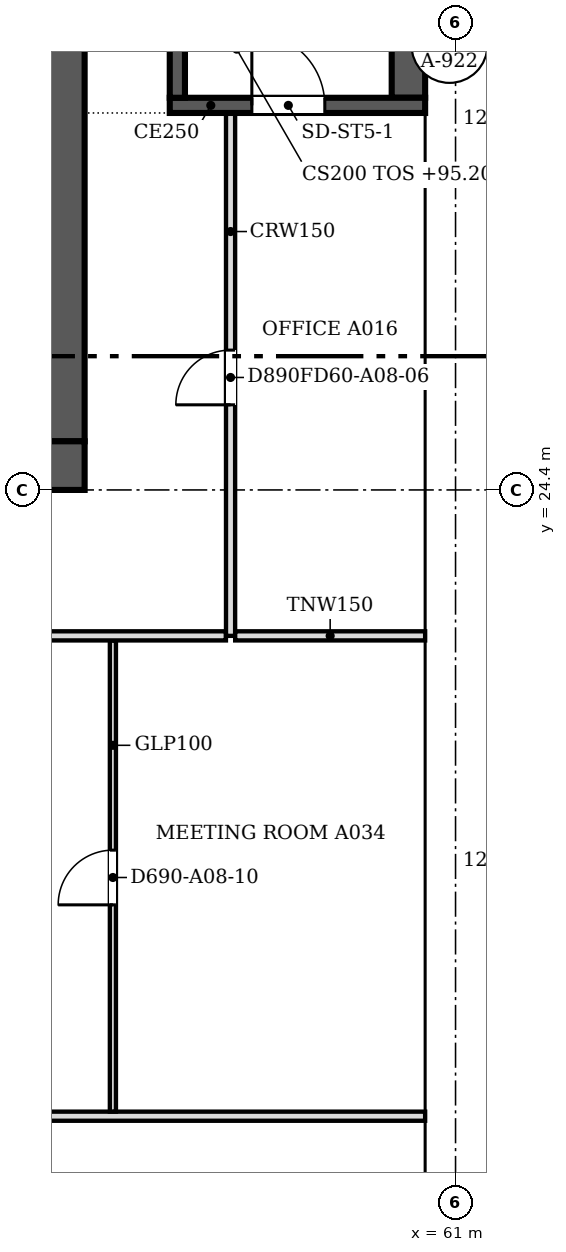
"""IFC4 building model, lengths in metres.
Left out: names, types, materials, properties, quantities, classifications, styles, units other than length and angle.
Written with IfcOpenShell. Run it as: python <this file> out.ifc"""

import sys

from ifc_helpers import new_model, si_unit, direction, frame, frame_2d, origin, place, context, subcontext, project, spatial, polyline, rectangle, outline, extrude, faceted_brep, source, transform, mapped, element, fill, save


model = new_model("IFC4")
c1 = context("Model", 3, precision=1e-05, world=origin(), true_north=direction((0.0, 1.0)))
c2 = subcontext(c1, "Body", "Model", "MODEL_VIEW")
j1 = project(units=[si_unit("LENGTHUNIT", "METRE"), si_unit("PLANEANGLEUNIT", "RADIAN")], contexts=[c1])
p1 = place(None, origin())
s1 = spatial("IfcSite", under=j1, at=p1, CompositionType="ELEMENT")
p2 = place(p1, origin())
s2 = spatial("IfcBuilding", under=s1, at=p2, CompositionType="ELEMENT")
p3 = place(p2, frame((0.0, 0.0, 95.2)))
s3 = spatial("IfcBuildingStorey", under=s2, at=p3, CompositionType="ELEMENT", Elevation=95.2)
m1 = source(origin(), c2, "Body", "SweptSolid", [
    extrude(outline(polyline([(3.05, 0.0), (6.1, 3.8), (3.05, 7.6), (0.0, 3.8), (3.05, 0.0)])), frame((0.0, 0.25, 0.0), z_axis=(0.0, -1.0, 0.0), x_axis=(1.0, 0.0, 0.0)), (0.0, 0.0, 1.0), 0.5),
])
p4 = place(p3, frame((60.75, 9.15, -3.8), z_axis=(0.0, 0.0, 1.0), x_axis=(0.0, 1.0, 0.0)))
e1 = element("IfcWall", 1, at=p4, inside=s3, PredefinedType="SOLIDWALL", context=c2, shape_type="MappedRepresentation", body=[
    mapped(m1, transform((0.0, 0.0, 0.0), scale=1.0)),
])
m2 = source(origin(), c2, "Body", "SweptSolid", [
    extrude(outline(polyline([(3.05, 0.399), (5.78, 3.8), (3.05, 7.201), (0.321, 3.8), (3.05, 0.399)])), frame((0.0, 0.26, 0.0), z_axis=(0.0, -1.0, 0.0), x_axis=(1.0, 0.0, 0.0)), (0.0, 0.0, 1.0), 0.52),
])
p5 = place(p4, origin())
e2 = element("IfcOpeningElement", 2, at=p5, cuts=e1, PredefinedType="OPENING", context=c2, shape_type="MappedRepresentation", body=[
    mapped(m2, transform((0.0, 0.0, 0.0), scale=1.0)),
])
p6 = place(p3, frame((60.75, 15.25, -3.8), z_axis=(0.0, 0.0, 1.0), x_axis=(0.0, 1.0, 0.0)))
e3 = element("IfcWall", 3, at=p6, inside=s3, PredefinedType="SOLIDWALL", context=c2, shape_type="MappedRepresentation", body=[
    mapped(m1, transform((0.0, 0.0, 0.0), scale=1.0)),
])
p7 = place(p6, origin())
e4 = element("IfcOpeningElement", 4, at=p7, cuts=e3, PredefinedType="OPENING", context=c2, shape_type="MappedRepresentation", body=[
    mapped(m2, transform((0.0, 0.0, 0.0), scale=1.0)),
])
m3 = source(origin(), c2, "Body", "Brep", [
    faceted_brep([(3.05, -0.25, 0.0), (6.1, -0.25, 3.8), (6.1, -0.25, 3.8), (3.05, -0.25, 7.6), (0.0, -0.25, 3.8), (0.0, 0.25, 3.8), (3.05, 0.25, 7.6), (6.1, 0.25, 3.8), (6.1, 0.25, 3.8), (3.05, 0.25, 0.0)], [[[0, 1, 2, 3, 4]], [[5, 6, 7, 8, 9]], [[9, 8, 1, 0]], [[7, 6, 3, 2]], [[6, 5, 4, 3]], [[5, 9, 0, 4]], [[1, 8, 7, 2]]]),
])
p8 = place(p3, frame((60.75, 21.35, -3.8), z_axis=(0.0, 0.0, 1.0), x_axis=(0.0, 1.0, 0.0)))
e5 = element("IfcWall", 5, at=p8, inside=s3, PredefinedType="SOLIDWALL", context=c2, shape_type="MappedRepresentation", body=[
    mapped(m3, transform((0.0, 0.0, 0.0), scale=1.0)),
])
p9 = place(p8, origin())
e6 = element("IfcOpeningElement", 6, at=p9, cuts=e5, PredefinedType="OPENING", context=c2, shape_type="MappedRepresentation", body=[
    mapped(m2, transform((0.0, 0.0, 0.0), scale=1.0)),
])
p10 = place(p3, frame((60.75, 27.45, -3.8), z_axis=(0.0, 0.0, 1.0), x_axis=(0.0, 1.0, 0.0)))
e7 = element("IfcWall", 7, at=p10, inside=s3, PredefinedType="SOLIDWALL", context=c2, shape_type="MappedRepresentation", body=[
    mapped(m1, transform((0.0, 0.0, 0.0), scale=1.0)),
])
p11 = place(p10, origin())
e8 = element("IfcOpeningElement", 8, at=p11, cuts=e7, PredefinedType="OPENING", context=c2, shape_type="MappedRepresentation", body=[
    mapped(m2, transform((0.0, 0.0, 0.0), scale=1.0)),
])
p12 = place(p2, frame((0.0, 0.0, 99.0)))
s4 = spatial("IfcBuildingStorey", under=s2, at=p12, CompositionType="ELEMENT", Elevation=99.0)
p13 = place(p12, frame((60.75, 12.2, -3.8), z_axis=(0.0, 0.0, 1.0), x_axis=(0.0, 1.0, 0.0)))
e9 = element("IfcWall", 9, at=p13, inside=s4, PredefinedType="SOLIDWALL", context=c2, shape_type="MappedRepresentation", body=[
    mapped(m1, transform((0.0, 0.0, 0.0), scale=1.0)),
])
p14 = place(p13, origin())
e10 = element("IfcOpeningElement", 10, at=p14, cuts=e9, PredefinedType="OPENING", context=c2, shape_type="MappedRepresentation", body=[
    mapped(m2, transform((0.0, 0.0, 0.0), scale=1.0)),
])
p15 = place(p12, frame((60.75, 18.3, -3.8), z_axis=(0.0, 0.0, 1.0), x_axis=(0.0, 1.0, 0.0)))
e11 = element("IfcWall", 11, at=p15, inside=s4, PredefinedType="SOLIDWALL", context=c2, shape_type="MappedRepresentation", body=[
    mapped(m3, transform((0.0, 0.0, 0.0), scale=1.0)),
])
p16 = place(p15, origin())
e12 = element("IfcOpeningElement", 12, at=p16, cuts=e11, PredefinedType="OPENING", context=c2, shape_type="MappedRepresentation", body=[
    mapped(m2, transform((0.0, 0.0, 0.0), scale=1.0)),
])
p17 = place(p12, frame((60.75, 24.4, -3.8), z_axis=(0.0, 0.0, 1.0), x_axis=(0.0, 1.0, 0.0)))
e13 = element("IfcWall", 13, at=p17, inside=s4, PredefinedType="SOLIDWALL", context=c2, shape_type="MappedRepresentation", body=[
    mapped(m1, transform((0.0, 0.0, 0.0), scale=1.0)),
])
p18 = place(p17, origin())
e14 = element("IfcOpeningElement", 14, at=p18, cuts=e13, PredefinedType="OPENING", context=c2, shape_type="MappedRepresentation", body=[
    mapped(m2, transform((0.0, 0.0, 0.0), scale=1.0)),
])
p19 = place(p12, frame((60.75, 30.5, -3.8), z_axis=(0.0, 0.0, 1.0), x_axis=(0.0, 1.0, 0.0)))
e15 = element("IfcWall", 15, at=p19, inside=s4, PredefinedType="SOLIDWALL", context=c2, shape_type="MappedRepresentation", body=[
    mapped(m1, transform((0.0, 0.0, 0.0), scale=1.0)),
])
p20 = place(p19, origin())
e16 = element("IfcOpeningElement", 16, at=p20, cuts=e15, PredefinedType="OPENING", context=c2, shape_type="MappedRepresentation", body=[
    mapped(m2, transform((0.0, 0.0, 0.0), scale=1.0)),
])
p21 = place(p3, frame((54.9, 24.8, 0.0), z_axis=(0.0, 0.0, 1.0), x_axis=(-1.0, 0.0, 0.0)))
e17 = element("IfcWall", 17, at=p21, inside=s3, PredefinedType="SHEAR", context=c2, shape_type="SweptSolid", body=[
    extrude(rectangle(XDim=24.4, YDim=0.8, at=frame_2d((12.2, 0.0))), origin(), (0.0, 0.0, 1.0), 3.8),
])
m4 = source(origin(), c2, "Body", "SweptSolid", [
    extrude(rectangle(XDim=1.2, YDim=2.1, at=frame_2d((0.6, 1.05))), frame((0.0, 0.41, 0.0), z_axis=(0.0, -1.0, 0.0), x_axis=(1.0, 0.0, 0.0)), (0.0, 0.0, 1.0), 0.82),
])
p22 = place(p21, frame((1.5, 0.0, 0.0)))
e18 = element("IfcOpeningElement", 18, at=p22, cuts=e17, PredefinedType="OPENING", context=c2, shape_type="MappedRepresentation", body=[
    mapped(m4, transform((0.0, 0.0, 0.0), scale=1.0)),
])
p23 = place(p3, frame((54.5, 48.0, 0.0), z_axis=(0.0, 0.0, 1.0), x_axis=(0.0, -1.0, 0.0)))
e19 = element("IfcWall", 19, at=p23, inside=s3, PredefinedType="SHEAR", context=c2, shape_type="SweptSolid", body=[
    extrude(rectangle(XDim=22.8, YDim=0.8, at=frame_2d((11.4, 0.0))), origin(), (0.0, 0.0, 1.0), 3.8),
])
p24 = place(p23, frame((4.7, 0.0, 0.0)))
e20 = element("IfcOpeningElement", 20, at=p24, cuts=e19, PredefinedType="OPENING", context=c2, shape_type="MappedRepresentation", body=[
    mapped(m4, transform((0.0, 0.0, 0.0), scale=1.0)),
])
p25 = place(p3, frame((60.5, 30.725, 0.0), z_axis=(0.0, 0.0, 1.0), x_axis=(-1.0, 0.0, 0.0)))
e21 = element("IfcWall", 21, at=p25, inside=s3, PredefinedType="SOLIDWALL", context=c2, shape_type="SweptSolid", body=[
    extrude(rectangle(XDim=4.2, YDim=0.25, at=frame_2d((2.1, 0.0))), origin(), (0.0, 0.0, 1.0), 3.8),
])
m5 = source(origin(), c2, "Body", "SweptSolid", [
    extrude(rectangle(XDim=1.2, YDim=2.1, at=frame_2d((0.6, 1.05))), frame((0.0, 0.135, 0.0), z_axis=(0.0, -1.0, 0.0), x_axis=(1.0, 0.0, 0.0)), (0.0, 0.0, 1.0), 0.27),
])
p26 = place(p25, frame((1.65, 0.0, 0.0)))
e22 = element("IfcOpeningElement", 22, at=p26, cuts=e21, PredefinedType="OPENING", context=c2, shape_type="MappedRepresentation", body=[
    mapped(m5, transform((0.0, 0.0, 0.0), scale=1.0)),
])
p27 = place(p3, frame((56.425, 30.85, 0.0), z_axis=(0.0, 0.0, 1.0), x_axis=(0.0, 1.0, 0.0)))
e23 = element("IfcWall", 23, at=p27, inside=s3, PredefinedType="SOLIDWALL", context=c2, shape_type="SweptSolid", body=[
    extrude(rectangle(XDim=8.0, YDim=0.25, at=frame_2d((4.0, 0.0))), origin(), (0.0, 0.0, 1.0), 3.8),
])
p28 = place(p3, frame((60.225, 38.85, 0.0), z_axis=(0.0, 0.0, 1.0), x_axis=(0.0, -1.0, 0.0)))
e24 = element("IfcWall", 24, at=p28, inside=s3, PredefinedType="SOLIDWALL", context=c2, shape_type="SweptSolid", body=[
    extrude(rectangle(XDim=8.0, YDim=0.55, at=frame_2d((4.0, 0.0))), origin(), (0.0, 0.0, 1.0), 3.8),
])
p29 = place(p3, frame((45.476, 14.1, 0.0), z_axis=(0.0, 0.0, 1.0), x_axis=(1.0, 0.0, 0.0)))
e25 = element("IfcWall", 25, at=p29, inside=s3, PredefinedType="PARTITIONING", context=c2, shape_type="SweptSolid", body=[
    extrude(rectangle(XDim=15.024, YDim=0.15, at=frame_2d((7.512, 0.0))), origin(), (0.0, 0.0, 1.0), 3.067),
])
p30 = place(p3, frame((55.365, 21.924, 0.0), z_axis=(0.0, 0.0, 1.0), x_axis=(0.0, -1.0, 0.0)))
e26 = element("IfcWall", 26, at=p30, inside=s3, PredefinedType="PARTITIONING", context=c2, shape_type="SweptSolid", body=[
    extrude(rectangle(XDim=7.748, YDim=0.1, at=frame_2d((3.874, 0.0))), origin(), (0.0, 0.0, 1.0), 3.067),
])
m6 = source(origin(), c2, "Body", "SweptSolid", [
    extrude(rectangle(XDim=0.9, YDim=2.1, at=frame_2d((0.45, 1.05))), frame((0.0, 0.06, 0.0), z_axis=(0.0, -1.0, 0.0), x_axis=(1.0, 0.0, 0.0)), (0.0, 0.0, 1.0), 0.12),
])
p31 = place(p30, frame((3.448, 0.0, 0.0)))
e27 = element("IfcOpeningElement", 27, at=p31, cuts=e26, PredefinedType="OPENING", context=c2, shape_type="MappedRepresentation", body=[
    mapped(m6, transform((0.0, 0.0, 0.0), scale=1.0)),
])
p32 = place(p3, frame((45.4, 22.0, 0.0), z_axis=(0.0, 0.0, 1.0), x_axis=(1.0, 0.0, 0.0)))
e28 = element("IfcWall", 28, at=p32, inside=s3, PredefinedType="PARTITIONING", context=c2, shape_type="SweptSolid", body=[
    extrude(rectangle(XDim=11.824, YDim=0.15, at=frame_2d((5.912, 0.0))), origin(), (0.0, 0.0, 1.0), 3.067),
])
p33 = place(p3, frame((57.3, 30.6, 0.0), z_axis=(0.0, 0.0, 1.0), x_axis=(0.0, -1.0, 0.0)))
e29 = element("IfcWall", 29, at=p33, inside=s3, PredefinedType="PARTITIONING", context=c2, shape_type="SweptSolid", body=[
    extrude(rectangle(XDim=8.6, YDim=0.15, at=frame_2d((4.3, 0.0))), origin(), (0.0, 0.0, 1.0), 3.067),
])
m7 = source(origin(), c2, "Body", "SweptSolid", [
    extrude(rectangle(XDim=0.9, YDim=2.1, at=frame_2d((0.45, 1.05))), frame((0.0, 0.085, 0.0), z_axis=(0.0, -1.0, 0.0), x_axis=(1.0, 0.0, 0.0)), (0.0, 0.0, 1.0), 0.17),
])
p34 = place(p33, frame((3.9, 0.0, 0.0)))
e30 = element("IfcOpeningElement", 30, at=p34, cuts=e29, PredefinedType="OPENING", context=c2, shape_type="MappedRepresentation", body=[
    mapped(m7, transform((0.0, 0.0, 0.0), scale=1.0)),
])
p35 = place(p3, frame((57.376, 22.0, 0.0), z_axis=(0.0, 0.0, 1.0), x_axis=(1.0, 0.0, 0.0)))
e31 = element("IfcWall", 31, at=p35, inside=s3, PredefinedType="PARTITIONING", context=c2, shape_type="SweptSolid", body=[
    extrude(rectangle(XDim=3.124, YDim=0.15, at=frame_2d((1.562, 0.0))), origin(), (0.0, 0.0, 1.0), 3.067),
])
m8 = source(origin(), c2, "Body", "SweptSolid", [
    extrude(rectangle(XDim=1.2, YDim=2.1, at=frame_2d((0.6, 1.05))), frame((0.0, 0.025, 0.0), z_axis=(0.0, -1.0, 0.0), x_axis=(1.0, 0.0, 0.0)), (0.0, 0.0, 1.0), 0.05),
])
p36 = place(p26, origin())
e32 = element("IfcDoor", 32, at=p36, inside=s3, OperationType="SINGLE_SWING_RIGHT", PredefinedType="DOOR", context=c2, shape_type="MappedRepresentation", body=[
    mapped(m8, transform((0.0, 0.0, 0.0), scale=1.0)),
])
fill(e22, e32)
m9 = source(origin(), c2, "Body", "SweptSolid", [
    extrude(rectangle(XDim=0.9, YDim=2.1, at=frame_2d((0.45, 1.05))), frame((0.0, 0.025, 0.0), z_axis=(0.0, -1.0, 0.0), x_axis=(1.0, 0.0, 0.0)), (0.0, 0.0, 1.0), 0.05),
])
p37 = place(p31, origin())
e33 = element("IfcDoor", 33, at=p37, inside=s3, OperationType="SINGLE_SWING_RIGHT", PredefinedType="DOOR", context=c2, shape_type="MappedRepresentation", body=[
    mapped(m9, transform((0.0, 0.0, 0.0), scale=1.0)),
])
fill(e27, e33)
p38 = place(p34, origin())
e34 = element("IfcDoor", 34, at=p38, inside=s3, OperationType="SINGLE_SWING_RIGHT", PredefinedType="DOOR", context=c2, shape_type="MappedRepresentation", body=[
    mapped(m9, transform((0.0, 0.0, 0.0), scale=1.0)),
])
fill(e30, e34)
save(model, sys.argv[1])
